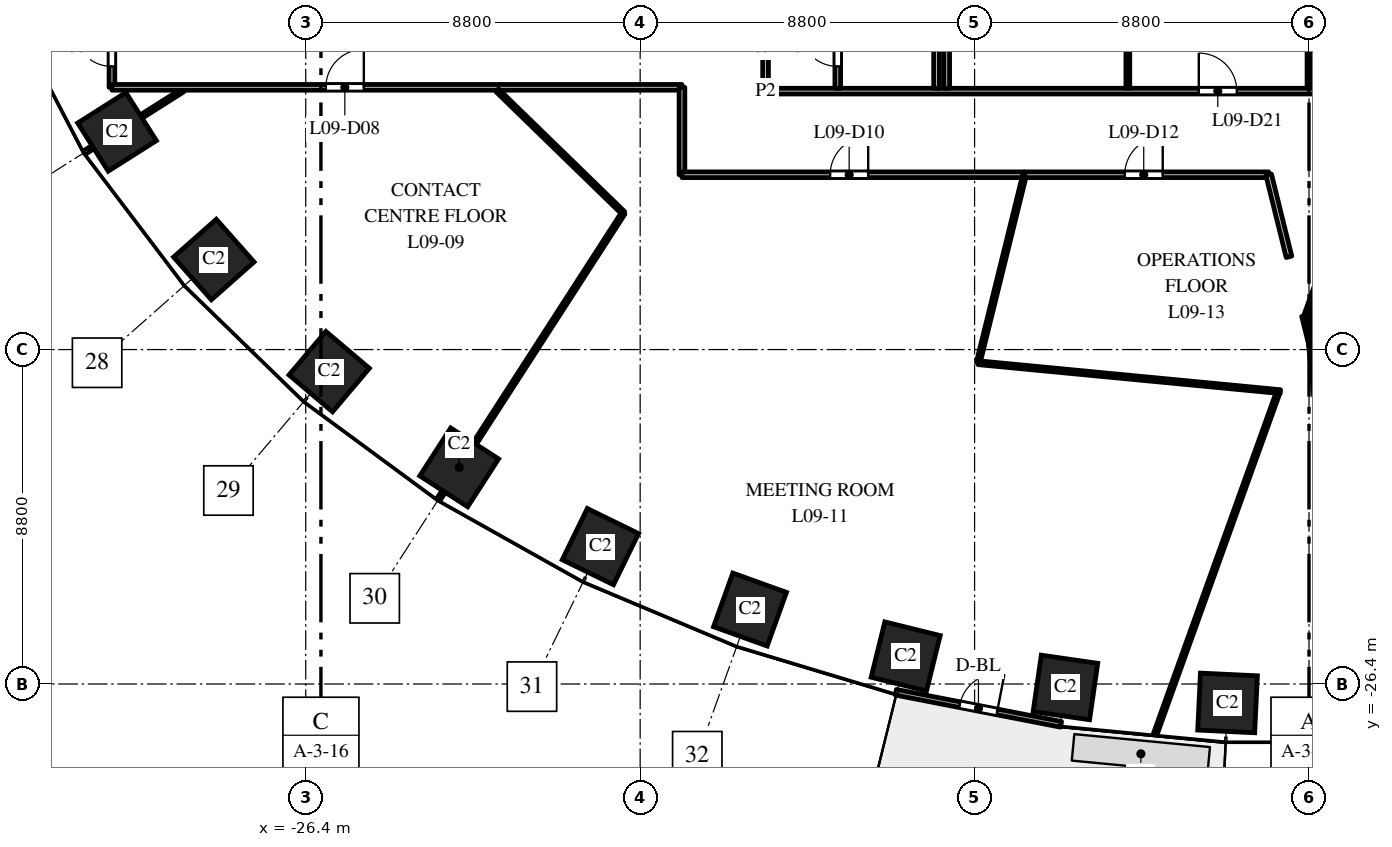
"""IFC4 building model, lengths in metres.
Left out: names, types, materials, properties, quantities, classifications, styles, units other than length and angle.
Written with IfcOpenShell. Run it as: python <this file> out.ifc"""

import sys

from ifc_helpers import new_model, si_unit, direction, frame, frame_2d, origin, origin_2d, place, context, subcontext, project, spatial, rectangle, extrude, element, fill, save


model = new_model("IFC4")
c1 = context("Model", 3, precision=1e-05, world=origin(), true_north=direction((0.0, 1.0)))
c2 = subcontext(c1, "Body", "Model", "MODEL_VIEW")
j1 = project(units=[si_unit("LENGTHUNIT", "METRE"), si_unit("PLANEANGLEUNIT", "RADIAN")], contexts=[c1])
p1 = place(None, origin())
s1 = spatial("IfcSite", under=j1, at=p1, CompositionType="ELEMENT")
p2 = place(p1, origin())
s2 = spatial("IfcBuilding", under=s1, at=p2, CompositionType="ELEMENT")
p3 = place(p2, frame((0.0, 0.0, 46.5)))
s3 = spatial("IfcBuildingStorey", under=s2, at=p3, CompositionType="ELEMENT", Elevation=46.5)
for number, where, z_axis, x_axis in (
    (1, (-31.365, -11.871, 0.0), (0.0, 0.0, 1.0), (0.535, -0.845, 0.0)),
    (2, (-28.819, -15.23, 0.0), (0.0, 0.0, 1.0), (0.663, -0.749, 0.0)),
    (3, (-25.783, -18.18, 0.0), (0.0, 0.0, 1.0), (0.763, -0.646, 0.0)),
    (4, (-22.362, -20.7, 0.0), (0.0, 0.0, 1.0), (0.84, -0.542, 0.0)),
    (5, (-18.646, -22.785, 0.0), (0.0, 0.0, 1.0), (0.898, -0.439, 0.0)),
    (6, (-14.709, -24.441, 0.0), (0.0, 0.0, 1.0), (0.941, -0.338, 0.0)),
    (7, (-10.613, -25.674, 0.0), (0.0, 0.0, 1.0), (0.971, -0.24, 0.0)),
    (8, (-6.409, -26.491, 0.0), (0.0, 0.0, 1.0), (0.99, -0.143, 0.0)),
    (9, (-2.143, -26.898, 0.0), (0.0, 0.0, 1.0), (0.999, -0.048, 0.0)),
):
    element("IfcColumn", number, at=place(p3, frame(where, z_axis=z_axis, x_axis=x_axis)), inside=s3, PredefinedType="COLUMN", context=c2, shape_type="SweptSolid", body=[
        extrude(rectangle(XDim=1.5, YDim=1.5, at=origin_2d()), origin(), (0.0, 0.0, 1.0), 4.0),
    ])
p4 = place(p3, frame((-10.871, -26.617, 0.0), z_axis=(0.0, 0.0, 1.0), x_axis=(0.981631174778, -0.190788460615, 0.0)))
e10 = element("IfcWall", 10, at=p4, inside=s3, PredefinedType="STANDARD", context=c2, shape_type="SweptSolid", body=[
    extrude(rectangle(XDim=4.426, YDim=0.15, at=frame_2d((2.213, 0.0))), origin(), (0.0, 0.0, 1.0), 3.7),
])
p5 = place(p4, frame((1.713, 0.0, 0.0)))
e11 = element("IfcOpeningElement", 11, at=p5, cuts=e10, PredefinedType="OPENING", context=c2, shape_type="SweptSolid", body=[
    extrude(rectangle(XDim=1.0, YDim=2.4, at=frame_2d((0.5, 1.2))), frame((0.0, 0.085, 0.0), z_axis=(0.0, -1.0, 0.0), x_axis=(1.0, 0.0, 0.0)), (0.0, 0.0, 1.0), 0.17),
])
p6 = place(p3, frame((-32.212, -12.408, 0.0), z_axis=(0.0, 0.0, 1.0), x_axis=(0.844810627195, 0.535065420467, 0.0)))
e12 = element("IfcWall", 12, at=p6, inside=s3, PredefinedType="PARTITIONING", context=c2, shape_type="SweptSolid", body=[
    extrude(rectangle(XDim=3.048, YDim=0.1, at=frame_2d((1.524, 0.0))), origin(), (0.0, 0.0, 1.0), 3.7),
])
p7 = place(p3, frame((-31.5, -10.7, 0.0), z_axis=(0.0, 0.0, 1.0), x_axis=(0.0, 1.0, 0.0)))
e13 = element("IfcWall", 13, at=p7, inside=s3, PredefinedType="PARTITIONING", context=c2, shape_type="SweptSolid", body=[
    extrude(rectangle(XDim=2.2, YDim=0.15, at=frame_2d((1.1, 0.0))), origin(), (0.0, 0.0, 1.0), 3.7),
])
p8 = place(p7, frame((0.55, 0.0, 0.0)))
e14 = element("IfcOpeningElement", 14, at=p8, cuts=e13, PredefinedType="OPENING", context=c2, shape_type="SweptSolid", body=[
    extrude(rectangle(XDim=1.0, YDim=2.1, at=frame_2d((0.5, 1.05))), frame((0.0, 0.085, 0.0), z_axis=(0.0, -1.0, 0.0), x_axis=(1.0, 0.0, 0.0)), (0.0, 0.0, 1.0), 0.17),
])
p9 = place(p3, frame((-31.5, -10.7, 0.0), z_axis=(0.0, 0.0, 1.0), x_axis=(1.0, 0.0, 0.0)))
e15 = element("IfcWall", 15, at=p9, inside=s3, PredefinedType="PARTITIONING", context=c2, shape_type="SweptSolid", body=[
    extrude(rectangle(XDim=15.0, YDim=0.15, at=frame_2d((7.5, 0.0))), origin(), (0.0, 0.0, 1.0), 3.1),
])
p10 = place(p9, frame((5.629, 0.0, 0.0)))
e16 = element("IfcOpeningElement", 16, at=p10, cuts=e15, PredefinedType="OPENING", context=c2, shape_type="SweptSolid", body=[
    extrude(rectangle(XDim=1.0, YDim=2.1, at=frame_2d((0.5, 1.05))), frame((0.0, 0.085, 0.0), z_axis=(0.0, -1.0, 0.0), x_axis=(1.0, 0.0, 0.0)), (0.0, 0.0, 1.0), 0.17),
])
p11 = place(p3, frame((-22.905, -21.542, 0.0), z_axis=(0.0, 0.0, 1.0), x_axis=(0.542241597628, 0.840222619192, 0.0)))
e17 = element("IfcWall", 17, at=p11, inside=s3, PredefinedType="PARTITIONING", context=c2, shape_type="SweptSolid", body=[
    extrude(rectangle(XDim=8.967, YDim=0.1, at=frame_2d((4.483, 0.0))), origin(), (0.0, 0.0, 1.0), 2.85),
])
p12 = place(p3, frame((-21.362, -10.778, 0.0), z_axis=(0.0, 0.0, 1.0), x_axis=(0.716869759063, -0.697207105917, 0.0)))
e18 = element("IfcWall", 18, at=p12, inside=s3, PredefinedType="PARTITIONING", context=c2, shape_type="SweptSolid", body=[
    extrude(rectangle(XDim=4.631, YDim=0.1, at=frame_2d((2.316, 0.0))), origin(), (0.0, 0.0, 1.0), 2.75),
])
p13 = place(p3, frame((-16.5, -13.0, 0.0), z_axis=(0.0, 0.0, 1.0), x_axis=(0.0, 1.0, 0.0)))
e19 = element("IfcWall", 19, at=p13, inside=s3, PredefinedType="PARTITIONING", context=c2, shape_type="SweptSolid", body=[
    extrude(rectangle(XDim=2.3, YDim=0.15, at=frame_2d((1.15, 0.0))), origin(), (0.0, 0.0, 1.0), 2.75),
])
p14 = place(p3, frame((-16.5, -13.0, 0.0), z_axis=(0.0, 0.0, 1.0), x_axis=(1.0, 0.0, 0.0)))
e20 = element("IfcWall", 20, at=p14, inside=s3, PredefinedType="PARTITIONING", context=c2, shape_type="SweptSolid", body=[
    extrude(rectangle(XDim=9.001, YDim=0.15, at=frame_2d((4.5, 0.0))), origin(), (0.0, 0.0, 1.0), 2.85),
])
p15 = place(p14, frame((3.9, 0.0, 0.0)))
e21 = element("IfcOpeningElement", 21, at=p15, cuts=e20, PredefinedType="OPENING", context=c2, shape_type="SweptSolid", body=[
    extrude(rectangle(XDim=1.0, YDim=2.1, at=frame_2d((0.5, 1.05))), frame((0.0, 0.085, 0.0), z_axis=(0.0, -1.0, 0.0), x_axis=(1.0, 0.0, 0.0)), (0.0, 0.0, 1.0), 0.17),
])
p16 = place(p3, frame((-14.3, -10.8, 0.0), z_axis=(0.0, 0.0, 1.0), x_axis=(0.0, 1.0, 0.0)))
e22 = element("IfcWall", 22, at=p16, inside=s3, PredefinedType="PARTITIONING", context=c2, shape_type="SweptSolid", body=[
    extrude(rectangle(XDim=21.6, YDim=0.15, at=frame_2d((10.8, 0.0))), origin(), (0.0, 0.0, 1.0), 2.75),
])
p17 = place(p16, frame((10.4, 0.0, 0.0)))
e23 = element("IfcOpeningElement", 23, at=p17, cuts=e22, PredefinedType="OPENING", context=c2, shape_type="SweptSolid", body=[
    extrude(rectangle(XDim=1.0, YDim=2.1, at=frame_2d((0.5, 1.05))), frame((0.0, 0.085, 0.0), z_axis=(0.0, -1.0, 0.0), x_axis=(1.0, 0.0, 0.0)), (0.0, 0.0, 1.0), 0.17),
])
p18 = place(p3, frame((-14.3, -10.8, 0.0), z_axis=(0.0, 0.0, 1.0), x_axis=(1.0, 0.0, 0.0)))
e24 = element("IfcWall", 24, at=p18, inside=s3, PredefinedType="PARTITIONING", context=c2, shape_type="SweptSolid", body=[
    extrude(rectangle(XDim=28.6, YDim=0.15, at=frame_2d((14.3, 0.0))), origin(), (0.0, 0.0, 1.0), 2.85),
])
p19 = place(p18, frame((11.4, 0.0, 0.0)))
e25 = element("IfcOpeningElement", 25, at=p19, cuts=e24, PredefinedType="OPENING", context=c2, shape_type="SweptSolid", body=[
    extrude(rectangle(XDim=1.0, YDim=2.1, at=frame_2d((0.5, 1.05))), frame((0.0, 0.085, 0.0), z_axis=(0.0, -1.0, 0.0), x_axis=(1.0, 0.0, 0.0)), (0.0, 0.0, 1.0), 0.17),
])
p20 = place(p18, frame((16.167, 0.0, 0.0)))
e26 = element("IfcOpeningElement", 26, at=p20, cuts=e24, PredefinedType="OPENING", context=c2, shape_type="SweptSolid", body=[
    extrude(rectangle(XDim=1.0, YDim=2.1, at=frame_2d((0.5, 1.05))), frame((0.0, 0.085, 0.0), z_axis=(0.0, -1.0, 0.0), x_axis=(1.0, 0.0, 0.0)), (0.0, 0.0, 1.0), 0.17),
])
p21 = place(p3, frame((-12.4, -10.725, 0.0), z_axis=(0.0, 0.0, 1.0), x_axis=(0.0, 1.0, 0.0)))
e27 = element("IfcWall", 27, at=p21, inside=s3, PredefinedType="PARTITIONING", context=c2, shape_type="SweptSolid", body=[
    extrude(rectangle(XDim=7.065, YDim=0.15, at=frame_2d((3.533, 0.0))), origin(), (0.0, 0.0, 1.0), 2.75),
])
p22 = place(p21, frame((0.575, 0.0, 0.0)))
e28 = element("IfcOpeningElement", 28, at=p22, cuts=e27, PredefinedType="OPENING", context=c2, shape_type="SweptSolid", body=[
    extrude(rectangle(XDim=1.0, YDim=2.1, at=frame_2d((0.5, 1.05))), frame((0.0, 0.085, 0.0), z_axis=(0.0, -1.0, 0.0), x_axis=(1.0, 0.0, 0.0)), (0.0, 0.0, 1.0), 0.17),
])
p23 = place(p21, frame((3.095, 0.0, 0.0)))
e29 = element("IfcOpeningElement", 29, at=p23, cuts=e27, PredefinedType="OPENING", context=c2, shape_type="SweptSolid", body=[
    extrude(rectangle(XDim=1.0, YDim=2.1, at=frame_2d((0.5, 1.05))), frame((0.0, 0.085, 0.0), z_axis=(0.0, -1.0, 0.0), x_axis=(1.0, 0.0, 0.0)), (0.0, 0.0, 1.0), 0.17),
])
p24 = place(p21, frame((5.447, 0.0, 0.0)))
e30 = element("IfcOpeningElement", 30, at=p24, cuts=e27, PredefinedType="OPENING", context=c2, shape_type="SweptSolid", body=[
    extrude(rectangle(XDim=1.0, YDim=2.1, at=frame_2d((0.5, 1.05))), frame((0.0, 0.085, 0.0), z_axis=(0.0, -1.0, 0.0), x_axis=(1.0, 0.0, 0.0)), (0.0, 0.0, 1.0), 0.17),
])
p25 = place(p3, frame((-9.8, -10.725, 0.0), z_axis=(0.0, 0.0, 1.0), x_axis=(0.0, 1.0, 0.0)))
e31 = element("IfcWall", 31, at=p25, inside=s3, PredefinedType="PARTITIONING", context=c2, shape_type="SweptSolid", body=[
    extrude(rectangle(XDim=7.065, YDim=0.15, at=frame_2d((3.533, 0.0))), origin(), (0.0, 0.0, 1.0), 2.75),
])
p26 = place(p3, frame((-9.533, -10.725, 0.0), z_axis=(0.0, 0.0, 1.0), x_axis=(0.0, 1.0, 0.0)))
e32 = element("IfcWall", 32, at=p26, inside=s3, PredefinedType="PARTITIONING", context=c2, shape_type="SweptSolid", body=[
    extrude(rectangle(XDim=21.45, YDim=0.15, at=frame_2d((10.725, 0.0))), origin(), (0.0, 0.0, 1.0), 2.75),
])
p27 = place(p26, frame((15.575, 0.0, 0.0)))
e33 = element("IfcOpeningElement", 33, at=p27, cuts=e32, PredefinedType="OPENING", context=c2, shape_type="SweptSolid", body=[
    extrude(rectangle(XDim=1.0, YDim=2.1, at=frame_2d((0.5, 1.05))), frame((0.0, 0.085, 0.0), z_axis=(0.0, -1.0, 0.0), x_axis=(1.0, 0.0, 0.0)), (0.0, 0.0, 1.0), 0.17),
])
p28 = place(p3, frame((-8.704, -17.946, 0.0), z_axis=(0.0, 0.0, 1.0), x_axis=(0.239704393154, 0.970845921814, 0.0)))
e34 = element("IfcWall", 34, at=p28, inside=s3, PredefinedType="PARTITIONING", context=c2, shape_type="SweptSolid", body=[
    extrude(rectangle(XDim=5.094, YDim=0.1, at=frame_2d((2.547, 0.0))), origin(), (0.0, 0.0, 1.0), 3.7),
])
p29 = place(p3, frame((-8.704, -17.946, 0.0), z_axis=(0.0, 0.0, 1.0), x_axis=(0.995451268437, -0.095272095422, 0.0)))
e35 = element("IfcWall", 35, at=p29, inside=s3, PredefinedType="PARTITIONING", context=c2, shape_type="SweptSolid", body=[
    extrude(rectangle(XDim=7.988, YDim=0.1, at=frame_2d((3.994, 0.0))), origin(), (0.0, 0.0, 1.0), 2.85),
])
p30 = place(p3, frame((-7.483, -13.0, 0.0), z_axis=(0.0, 0.0, 1.0), x_axis=(1.0, 0.0, 0.0)))
e36 = element("IfcWall", 36, at=p30, inside=s3, PredefinedType="PARTITIONING", context=c2, shape_type="SweptSolid", body=[
    extrude(rectangle(XDim=6.422, YDim=0.15, at=frame_2d((3.211, 0.0))), origin(), (0.0, 0.0, 1.0), 2.85),
])
p31 = place(p30, frame((2.634, 0.0, 0.0)))
e37 = element("IfcOpeningElement", 37, at=p31, cuts=e36, PredefinedType="OPENING", context=c2, shape_type="SweptSolid", body=[
    extrude(rectangle(XDim=1.0, YDim=2.1, at=frame_2d((0.5, 1.05))), frame((0.0, 0.085, 0.0), z_axis=(0.0, -1.0, 0.0), x_axis=(1.0, 0.0, 0.0)), (0.0, 0.0, 1.0), 0.17),
])
p32 = place(p3, frame((-4.767, -10.725, 0.0), z_axis=(0.0, 0.0, 1.0), x_axis=(0.0, 1.0, 0.0)))
e38 = element("IfcWall", 38, at=p32, inside=s3, PredefinedType="PARTITIONING", context=c2, shape_type="SweptSolid", body=[
    extrude(rectangle(XDim=4.362, YDim=0.1, at=frame_2d((2.181, 0.0))), origin(), (0.0, 0.0, 1.0), 2.85),
])
p33 = place(p3, frame((-4.046, -27.717, 0.0), z_axis=(0.0, 0.0, 1.0), x_axis=(0.338447260677, 0.940985362129, 0.0)))
e39 = element("IfcWall", 39, at=p33, inside=s3, PredefinedType="PARTITIONING", context=c2, shape_type="SweptSolid", body=[
    extrude(rectangle(XDim=9.528, YDim=0.1, at=frame_2d((4.764, 0.0))), origin(), (0.0, 0.0, 1.0), 2.85),
])
p34 = place(p3, frame((-1.061, -13.0, 0.0), z_axis=(0.0, 0.0, 1.0), x_axis=(0.240081023427, -0.9707528533, 0.0)))
e40 = element("IfcWall", 40, at=p34, inside=s3, PredefinedType="PARTITIONING", context=c2, shape_type="SweptSolid", body=[
    extrude(rectangle(XDim=2.224, YDim=0.15, at=frame_2d((1.112, 0.0))), origin(), (0.0, 0.0, 1.0), 2.85),
])
p35 = place(p3, frame((-0.143, -16.715, 0.0), z_axis=(0.0, 0.0, 1.0), x_axis=(0.23958475997, -0.970875451739, 0.0)))
e41 = element("IfcWall", 41, at=p35, inside=s3, PredefinedType="PARTITIONING", context=c2, shape_type="SweptSolid", body=[
    extrude(rectangle(XDim=0.876, YDim=0.1, at=frame_2d((0.438, 0.0))), origin(), (0.0, 0.0, 1.0), 3.7),
])
p36 = place(p3, frame((-0.09, -16.718, 0.0), z_axis=(0.0, 0.0, 1.0), x_axis=(0.3382216124, 0.941066491225, 0.0)))
e42 = element("IfcWall", 42, at=p36, inside=s3, PredefinedType="PARTITIONING", context=c2, shape_type="SweptSolid", body=[
    extrude(rectangle(XDim=1.771, YDim=0.1, at=frame_2d((0.886, 0.0))), origin(), (0.0, 0.0, 1.0), 3.7),
])
p37 = place(p3, frame((0.0, -10.725, 0.0), z_axis=(0.0, 0.0, 1.0), x_axis=(0.0, 1.0, 0.0)))
e43 = element("IfcWall", 43, at=p37, inside=s3, PredefinedType="PARTITIONING", context=c2, shape_type="SweptSolid", body=[
    extrude(rectangle(XDim=3.221, YDim=0.1, at=frame_2d((1.611, 0.0))), origin(), (0.0, 0.0, 1.0), 3.7),
])
p38 = place(p3, frame((0.04, -17.284, 0.0), z_axis=(0.0, 0.0, 1.0), x_axis=(0.047302948177, 0.998880589006, 0.0)))
e44 = element("IfcWall", 44, at=p38, inside=s3, PredefinedType="PARTITIONING", context=c2, shape_type="SweptSolid", body=[
    extrude(rectangle(XDim=0.929, YDim=0.1, at=frame_2d((0.464, 0.0))), origin(), (0.0, 0.0, 1.0), 3.7),
])
p39 = place(p3, frame((0.038, -17.474, 0.0), z_axis=(0.0, 0.0, 1.0), x_axis=(0.100886401076, -0.99489795159, 0.0)))
e45 = element("IfcWall", 45, at=p39, inside=s3, PredefinedType="PARTITIONING", context=c2, shape_type="SweptSolid", body=[
    extrude(rectangle(XDim=1.329, YDim=0.1, at=frame_2d((0.664, 0.0))), origin(), (0.0, 0.0, 1.0), 3.7),
])
p40 = place(p5, origin())
e46 = element("IfcDoor", 46, at=p40, inside=s3, OperationType="SINGLE_SWING_RIGHT", PredefinedType="DOOR", context=c2, shape_type="SweptSolid", body=[
    extrude(rectangle(XDim=1.0, YDim=2.4, at=frame_2d((0.5, 1.2))), frame((0.0, 0.025, 0.0), z_axis=(0.0, -1.0, 0.0), x_axis=(1.0, 0.0, 0.0)), (0.0, 0.0, 1.0), 0.05),
])
fill(e11, e46)
p41 = place(p22, origin())
e47 = element("IfcDoor", 47, at=p41, inside=s3, OperationType="SINGLE_SWING_RIGHT", PredefinedType="DOOR", context=c2, shape_type="SweptSolid", body=[
    extrude(rectangle(XDim=1.0, YDim=2.1, at=frame_2d((0.5, 1.05))), frame((0.0, 0.025, 0.0), z_axis=(0.0, -1.0, 0.0), x_axis=(1.0, 0.0, 0.0)), (0.0, 0.0, 1.0), 0.05),
])
fill(e28, e47)
p42 = place(p8, origin())
e48 = element("IfcDoor", 48, at=p42, inside=s3, OperationType="SINGLE_SWING_RIGHT", PredefinedType="DOOR", context=c2, shape_type="SweptSolid", body=[
    extrude(rectangle(XDim=1.0, YDim=2.1, at=frame_2d((0.5, 1.05))), frame((0.0, 0.025, 0.0), z_axis=(0.0, -1.0, 0.0), x_axis=(1.0, 0.0, 0.0)), (0.0, 0.0, 1.0), 0.05),
])
fill(e14, e48)
p43 = place(p10, origin())
e49 = element("IfcDoor", 49, at=p43, inside=s3, OperationType="SINGLE_SWING_RIGHT", PredefinedType="DOOR", context=c2, shape_type="SweptSolid", body=[
    extrude(rectangle(XDim=1.0, YDim=2.1, at=frame_2d((0.5, 1.05))), frame((0.0, 0.025, 0.0), z_axis=(0.0, -1.0, 0.0), x_axis=(1.0, 0.0, 0.0)), (0.0, 0.0, 1.0), 0.05),
])
fill(e16, e49)
p44 = place(p15, origin())
e50 = element("IfcDoor", 50, at=p44, inside=s3, OperationType="SINGLE_SWING_RIGHT", PredefinedType="DOOR", context=c2, shape_type="SweptSolid", body=[
    extrude(rectangle(XDim=1.0, YDim=2.1, at=frame_2d((0.5, 1.05))), frame((0.0, 0.025, 0.0), z_axis=(0.0, -1.0, 0.0), x_axis=(1.0, 0.0, 0.0)), (0.0, 0.0, 1.0), 0.05),
])
fill(e21, e50)
p45 = place(p31, origin())
e51 = element("IfcDoor", 51, at=p45, inside=s3, OperationType="SINGLE_SWING_RIGHT", PredefinedType="DOOR", context=c2, shape_type="SweptSolid", body=[
    extrude(rectangle(XDim=1.0, YDim=2.1, at=frame_2d((0.5, 1.05))), frame((0.0, 0.025, 0.0), z_axis=(0.0, -1.0, 0.0), x_axis=(1.0, 0.0, 0.0)), (0.0, 0.0, 1.0), 0.05),
])
fill(e37, e51)
p46 = place(p19, origin())
e52 = element("IfcDoor", 52, at=p46, inside=s3, OperationType="SINGLE_SWING_LEFT", PredefinedType="DOOR", context=c2, shape_type="SweptSolid", body=[
    extrude(rectangle(XDim=1.0, YDim=2.1, at=frame_2d((0.5, 1.05))), frame((0.0, 0.025, 0.0), z_axis=(0.0, -1.0, 0.0), x_axis=(1.0, 0.0, 0.0)), (0.0, 0.0, 1.0), 0.05),
])
fill(e25, e52)
save(model, sys.argv[1])
